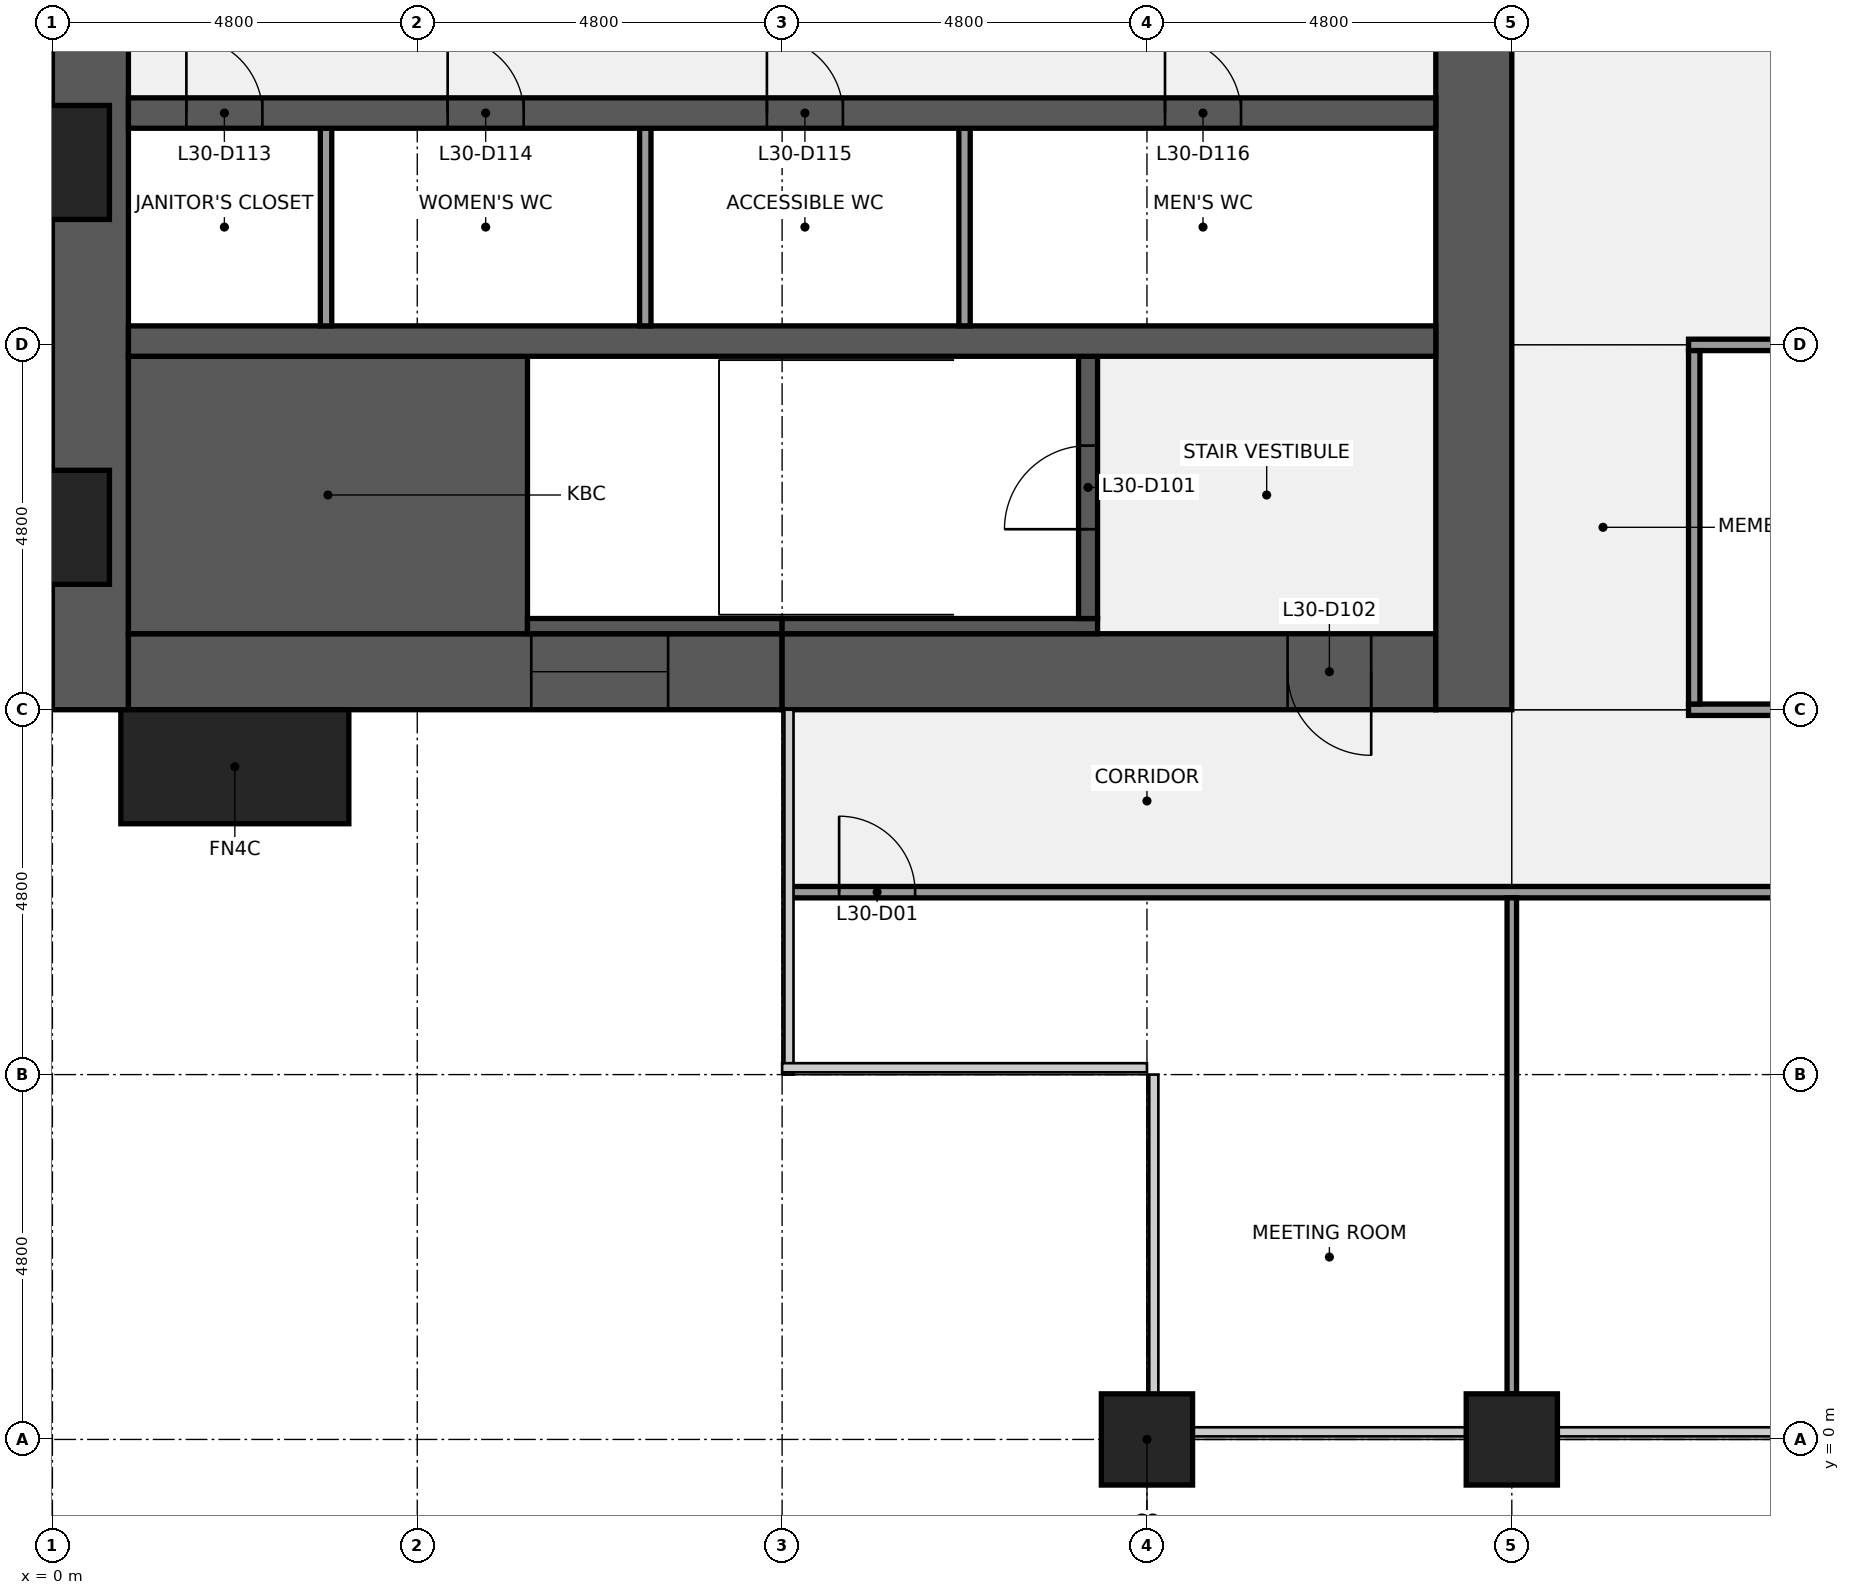
"""IFC4 building model, lengths in metres.
Left out: names, types, materials, properties, quantities, classifications, styles, units other than length and angle.
Written with IfcOpenShell. Run it as: python <this file> out.ifc"""

import sys

from ifc_helpers import new_model, si_unit, direction, frame, frame_2d, origin, origin_2d, place, context, subcontext, project, spatial, rectangle, extrude, element, fill, save


model = new_model("IFC4")
c1 = context("Model", 3, precision=1e-05, world=origin(), true_north=direction((0.0, 1.0)))
c2 = subcontext(c1, "Body", "Model", "MODEL_VIEW")
j1 = project(units=[si_unit("LENGTHUNIT", "METRE"), si_unit("PLANEANGLEUNIT", "RADIAN")], contexts=[c1])
p1 = place(None, origin())
s1 = spatial("IfcSite", under=j1, at=p1, CompositionType="ELEMENT")
p2 = place(p1, origin())
s2 = spatial("IfcBuilding", under=s1, at=p2, CompositionType="ELEMENT")
p3 = place(p2, frame((0.0, 0.0, 140.1)))
s3 = spatial("IfcBuildingStorey", under=s2, at=p3, CompositionType="ELEMENT", Elevation=140.1)
for number, where, z_axis, x_axis in (
    (1, (14.4, 0.0, 0.0), (0.0, 0.0, 1.0), (1.0, 0.0, 0.0)),
    (2, (19.2, 0.0, 0.0), (0.0, 0.0, 1.0), (1.0, 0.0, 0.0)),
):
    element("IfcColumn", number, at=place(p3, frame(where, z_axis=z_axis, x_axis=x_axis)), inside=s3, PredefinedType="COLUMN", context=c2, shape_type="SweptSolid", body=[
        extrude(rectangle(XDim=1.2, YDim=1.2, at=origin_2d()), origin(), (0.0, 0.0, 1.0), 4.0),
    ])
p4 = place(p3, frame((0.5, 9.6, 0.0), z_axis=(0.0, 0.0, 1.0), x_axis=(0.0, 1.0, 0.0)))
e3 = element("IfcWall", 3, at=p4, inside=s3, PredefinedType="SHEAR", context=c2, shape_type="SweptSolid", body=[
    extrude(rectangle(XDim=28.8, YDim=1.0, at=frame_2d((14.4, 0.0))), origin(), (0.0, 0.0, 1.0), 3.84),
])
p5 = place(p4, frame((8.85, 0.0, 0.9)))
e4 = element("IfcOpeningElement", 4, at=p5, cuts=e3, PredefinedType="OPENING", context=c2, shape_type="SweptSolid", body=[
    extrude(rectangle(XDim=1.5, YDim=1.5, at=frame_2d((0.75, 0.75))), frame((0.0, 0.51, 0.0), z_axis=(0.0, -1.0, 0.0), x_axis=(1.0, 0.0, 0.0)), (0.0, 0.0, 1.0), 1.02),
])
p6 = place(p4, frame((18.45, 0.0, 0.9)))
e5 = element("IfcOpeningElement", 5, at=p6, cuts=e3, PredefinedType="OPENING", context=c2, shape_type="SweptSolid", body=[
    extrude(rectangle(XDim=1.5, YDim=1.5, at=frame_2d((0.75, 0.75))), frame((0.0, 0.51, 0.0), z_axis=(0.0, -1.0, 0.0), x_axis=(1.0, 0.0, 0.0)), (0.0, 0.0, 1.0), 1.02),
])
p7 = place(p3, frame((9.6, 10.1, 0.0), z_axis=(0.0, 0.0, 1.0), x_axis=(-1.0, 0.0, 0.0)))
e6 = element("IfcWall", 6, at=p7, inside=s3, PredefinedType="SHEAR", context=c2, shape_type="SweptSolid", body=[
    extrude(rectangle(XDim=8.6, YDim=1.0, at=frame_2d((4.3, 0.0))), origin(), (0.0, 0.0, 1.0), 3.84),
])
p8 = place(p7, frame((1.5, 0.0, 0.9)))
e7 = element("IfcOpeningElement", 7, at=p8, cuts=e6, PredefinedType="OPENING", context=c2, shape_type="SweptSolid", body=[
    extrude(rectangle(XDim=1.8, YDim=1.5, at=frame_2d((0.9, 0.75))), frame((0.0, 0.51, 0.0), z_axis=(0.0, -1.0, 0.0), x_axis=(1.0, 0.0, 0.0)), (0.0, 0.0, 1.0), 1.02),
])
p9 = place(p3, frame((18.2, 10.1, 0.0), z_axis=(0.0, 0.0, 1.0), x_axis=(-1.0, 0.0, 0.0)))
e8 = element("IfcWall", 8, at=p9, inside=s3, PredefinedType="SHEAR", context=c2, shape_type="SweptSolid", body=[
    extrude(rectangle(XDim=8.6, YDim=1.0, at=frame_2d((4.3, 0.0))), origin(), (0.0, 0.0, 1.0), 3.84),
])
p10 = place(p9, frame((0.85, 0.0, 0.0)))
e9 = element("IfcOpeningElement", 9, at=p10, cuts=e8, PredefinedType="OPENING", context=c2, shape_type="SweptSolid", body=[
    extrude(rectangle(XDim=1.1, YDim=2.1, at=frame_2d((0.55, 1.05))), frame((0.0, 0.51, 0.0), z_axis=(0.0, -1.0, 0.0), x_axis=(1.0, 0.0, 0.0)), (0.0, 0.0, 1.0), 1.02),
])
p11 = place(p3, frame((18.7, 38.4, 0.0), z_axis=(0.0, 0.0, 1.0), x_axis=(0.0, -1.0, 0.0)))
e10 = element("IfcWall", 10, at=p11, inside=s3, PredefinedType="SHEAR", context=c2, shape_type="SweptSolid", body=[
    extrude(rectangle(XDim=28.8, YDim=1.0, at=frame_2d((14.4, 0.0))), origin(), (0.0, 0.0, 1.0), 3.84),
])
p12 = place(p11, frame((18.3, 0.0, 0.0)))
e11 = element("IfcOpeningElement", 11, at=p12, cuts=e10, PredefinedType="OPENING", context=c2, shape_type="SweptSolid", body=[
    extrude(rectangle(XDim=1.8, YDim=2.1, at=frame_2d((0.9, 1.05))), frame((0.0, 0.51, 0.0), z_axis=(0.0, -1.0, 0.0), x_axis=(1.0, 0.0, 0.0)), (0.0, 0.0, 1.0), 1.02),
])
p13 = place(p11, frame((8.7, 0.0, 0.0)))
e12 = element("IfcOpeningElement", 12, at=p13, cuts=e10, PredefinedType="OPENING", context=c2, shape_type="SweptSolid", body=[
    extrude(rectangle(XDim=1.8, YDim=2.1, at=frame_2d((0.9, 1.05))), frame((0.0, 0.51, 0.0), z_axis=(0.0, -1.0, 0.0), x_axis=(1.0, 0.0, 0.0)), (0.0, 0.0, 1.0), 1.02),
])
p14 = place(p3, frame((1.0, 12.425, 0.0), z_axis=(0.0, 0.0, 1.0), x_axis=(1.0, 0.0, 0.0)))
e13 = element("IfcWall", 13, at=p14, inside=s3, PredefinedType="SHEAR", context=c2, shape_type="SweptSolid", body=[
    extrude(rectangle(XDim=5.25, YDim=3.65, at=frame_2d((2.625, 0.0))), origin(), (0.0, 0.0, 1.0), 3.84),
])
p15 = place(p3, frame((6.25, 10.7, 0.0), z_axis=(0.0, 0.0, 1.0), x_axis=(1.0, 0.0, 0.0)))
e14 = element("IfcWall", 14, at=p15, inside=s3, PredefinedType="SHEAR", context=c2, shape_type="SweptSolid", body=[
    extrude(rectangle(XDim=3.35, YDim=0.2, at=frame_2d((1.675, 0.0))), origin(), (0.0, 0.0, 1.0), 3.84),
])
p16 = place(p3, frame((9.6, 10.7, 0.0), z_axis=(0.0, 0.0, 1.0), x_axis=(1.0, 0.0, 0.0)))
e15 = element("IfcWall", 15, at=p16, inside=s3, PredefinedType="SHEAR", context=c2, shape_type="SweptSolid", body=[
    extrude(rectangle(XDim=4.15, YDim=0.2, at=frame_2d((2.075, 0.0))), origin(), (0.0, 0.0, 1.0), 3.84),
])
p17 = place(p3, frame((13.625, 10.8, 0.0), z_axis=(0.0, 0.0, 1.0), x_axis=(0.0, 1.0, 0.0)))
e16 = element("IfcWall", 16, at=p17, inside=s3, PredefinedType="SHEAR", context=c2, shape_type="SweptSolid", body=[
    extrude(rectangle(XDim=3.45, YDim=0.25, at=frame_2d((1.725, 0.0))), origin(), (0.0, 0.0, 1.0), 3.84),
])
p18 = place(p17, frame((1.175, 0.0, 0.0)))
e17 = element("IfcOpeningElement", 17, at=p18, cuts=e16, PredefinedType="OPENING", context=c2, shape_type="SweptSolid", body=[
    extrude(rectangle(XDim=1.1, YDim=2.1, at=frame_2d((0.55, 1.05))), frame((0.0, 0.135, 0.0), z_axis=(0.0, -1.0, 0.0), x_axis=(1.0, 0.0, 0.0)), (0.0, 0.0, 1.0), 0.27),
])
p19 = place(p3, frame((1.0, 14.45, 0.0), z_axis=(0.0, 0.0, 1.0), x_axis=(1.0, 0.0, 0.0)))
e18 = element("IfcWall", 18, at=p19, inside=s3, PredefinedType="SHEAR", context=c2, shape_type="SweptSolid", body=[
    extrude(rectangle(XDim=17.2, YDim=0.4, at=frame_2d((8.6, 0.0))), origin(), (0.0, 0.0, 1.0), 3.84),
])
for number, where, z_axis, x_axis in (
    (19, (3.6, 14.65, 0.0), (0.0, 0.0, 1.0), (0.0, 1.0, 0.0)),
    (20, (7.8, 14.65, 0.0), (0.0, 0.0, 1.0), (0.0, 1.0, 0.0)),
    (21, (12.0, 14.65, 0.0), (0.0, 0.0, 1.0), (0.0, 1.0, 0.0)),
):
    element("IfcWall", number, at=place(p3, frame(where, z_axis=z_axis, x_axis=x_axis)), inside=s3, PredefinedType="PARTITIONING", context=c2, shape_type="SweptSolid", body=[
        extrude(rectangle(XDim=2.6, YDim=0.15, at=frame_2d((1.3, 0.0))), origin(), (0.0, 0.0, 1.0), 3.84),
    ])
p20 = place(p3, frame((1.0, 17.45, 0.0), z_axis=(0.0, 0.0, 1.0), x_axis=(1.0, 0.0, 0.0)))
e22 = element("IfcWall", 22, at=p20, inside=s3, PredefinedType="SHEAR", context=c2, shape_type="SweptSolid", body=[
    extrude(rectangle(XDim=17.2, YDim=0.4, at=frame_2d((8.6, 0.0))), origin(), (0.0, 0.0, 1.0), 3.84),
])
p21 = place(p20, frame((0.762, 0.0, 0.0)))
e23 = element("IfcOpeningElement", 23, at=p21, cuts=e22, PredefinedType="OPENING", context=c2, shape_type="SweptSolid", body=[
    extrude(rectangle(XDim=1.0, YDim=2.1, at=frame_2d((0.5, 1.05))), frame((0.0, 0.21, 0.0), z_axis=(0.0, -1.0, 0.0), x_axis=(1.0, 0.0, 0.0)), (0.0, 0.0, 1.0), 0.42),
])
p22 = place(p20, frame((4.2, 0.0, 0.0)))
e24 = element("IfcOpeningElement", 24, at=p22, cuts=e22, PredefinedType="OPENING", context=c2, shape_type="SweptSolid", body=[
    extrude(rectangle(XDim=1.0, YDim=2.1, at=frame_2d((0.5, 1.05))), frame((0.0, 0.21, 0.0), z_axis=(0.0, -1.0, 0.0), x_axis=(1.0, 0.0, 0.0)), (0.0, 0.0, 1.0), 0.42),
])
p23 = place(p20, frame((8.4, 0.0, 0.0)))
e25 = element("IfcOpeningElement", 25, at=p23, cuts=e22, PredefinedType="OPENING", context=c2, shape_type="SweptSolid", body=[
    extrude(rectangle(XDim=1.0, YDim=2.1, at=frame_2d((0.5, 1.05))), frame((0.0, 0.21, 0.0), z_axis=(0.0, -1.0, 0.0), x_axis=(1.0, 0.0, 0.0)), (0.0, 0.0, 1.0), 0.42),
])
p24 = place(p20, frame((13.637, 0.0, 0.0)))
e26 = element("IfcOpeningElement", 26, at=p24, cuts=e22, PredefinedType="OPENING", context=c2, shape_type="SweptSolid", body=[
    extrude(rectangle(XDim=1.0, YDim=2.1, at=frame_2d((0.5, 1.05))), frame((0.0, 0.21, 0.0), z_axis=(0.0, -1.0, 0.0), x_axis=(1.0, 0.0, 0.0)), (0.0, 0.0, 1.0), 0.42),
])
p25 = place(p3, frame((9.7, 7.2, 0.0), z_axis=(0.0, 0.0, 1.0), x_axis=(1.0, 0.0, 0.0)))
e27 = element("IfcWall", 27, at=p25, inside=s3, PredefinedType="PARTITIONING", context=c2, shape_type="SweptSolid", body=[
    extrude(rectangle(XDim=38.2, YDim=0.15, at=frame_2d((19.1, 0.0))), origin(), (0.0, 0.0, 1.0), 2.936),
])
p26 = place(p25, frame((0.65, 0.0, 0.0)))
e28 = element("IfcOpeningElement", 28, at=p26, cuts=e27, PredefinedType="OPENING", context=c2, shape_type="SweptSolid", body=[
    extrude(rectangle(XDim=1.0, YDim=2.1, at=frame_2d((0.5, 1.05))), frame((0.0, 0.085, 0.0), z_axis=(0.0, -1.0, 0.0), x_axis=(1.0, 0.0, 0.0)), (0.0, 0.0, 1.0), 0.17),
])
p27 = place(p25, frame((13.8, 0.0, 0.0)))
e29 = element("IfcOpeningElement", 29, at=p27, cuts=e27, PredefinedType="OPENING", context=c2, shape_type="SweptSolid", body=[
    extrude(rectangle(XDim=1.0, YDim=2.1, at=frame_2d((0.5, 1.05))), frame((0.0, 0.085, 0.0), z_axis=(0.0, -1.0, 0.0), x_axis=(1.0, 0.0, 0.0)), (0.0, 0.0, 1.0), 0.17),
])
p28 = place(p25, frame((19.8, 0.0, 0.0)))
e30 = element("IfcOpeningElement", 30, at=p28, cuts=e27, PredefinedType="OPENING", context=c2, shape_type="SweptSolid", body=[
    extrude(rectangle(XDim=1.0, YDim=2.1, at=frame_2d((0.5, 1.05))), frame((0.0, 0.085, 0.0), z_axis=(0.0, -1.0, 0.0), x_axis=(1.0, 0.0, 0.0)), (0.0, 0.0, 1.0), 0.17),
])
p29 = place(p25, frame((23.4, 0.0, 0.0)))
e31 = element("IfcOpeningElement", 31, at=p29, cuts=e27, PredefinedType="OPENING", context=c2, shape_type="SweptSolid", body=[
    extrude(rectangle(XDim=1.0, YDim=2.1, at=frame_2d((0.5, 1.05))), frame((0.0, 0.085, 0.0), z_axis=(0.0, -1.0, 0.0), x_axis=(1.0, 0.0, 0.0)), (0.0, 0.0, 1.0), 0.17),
])
p30 = place(p25, frame((27.0, 0.0, 0.0)))
e32 = element("IfcOpeningElement", 32, at=p30, cuts=e27, PredefinedType="OPENING", context=c2, shape_type="SweptSolid", body=[
    extrude(rectangle(XDim=1.0, YDim=2.1, at=frame_2d((0.5, 1.05))), frame((0.0, 0.085, 0.0), z_axis=(0.0, -1.0, 0.0), x_axis=(1.0, 0.0, 0.0)), (0.0, 0.0, 1.0), 0.17),
])
p31 = place(p25, frame((32.95, 0.0, 0.0)))
e33 = element("IfcOpeningElement", 33, at=p31, cuts=e27, PredefinedType="OPENING", context=c2, shape_type="SweptSolid", body=[
    extrude(rectangle(XDim=1.0, YDim=2.1, at=frame_2d((0.5, 1.05))), frame((0.0, 0.085, 0.0), z_axis=(0.0, -1.0, 0.0), x_axis=(1.0, 0.0, 0.0)), (0.0, 0.0, 1.0), 0.17),
])
p32 = place(p3, frame((21.525, 9.6, 0.0), z_axis=(0.0, 0.0, 1.0), x_axis=(1.0, 0.0, 0.0)))
e34 = element("IfcWall", 34, at=p32, inside=s3, PredefinedType="PARTITIONING", context=c2, shape_type="SweptSolid", body=[
    extrude(rectangle(XDim=14.55, YDim=0.15, at=frame_2d((7.275, 0.0))), origin(), (0.0, 0.0, 1.0), 2.936),
])
p33 = place(p32, frame((3.175, 0.0, 0.0)))
e35 = element("IfcOpeningElement", 35, at=p33, cuts=e34, PredefinedType="OPENING", context=c2, shape_type="SweptSolid", body=[
    extrude(rectangle(XDim=1.0, YDim=2.1, at=frame_2d((0.5, 1.05))), frame((0.0, 0.085, 0.0), z_axis=(0.0, -1.0, 0.0), x_axis=(1.0, 0.0, 0.0)), (0.0, 0.0, 1.0), 0.17),
])
p34 = place(p32, frame((10.375, 0.0, 0.0)))
e36 = element("IfcOpeningElement", 36, at=p34, cuts=e34, PredefinedType="OPENING", context=c2, shape_type="SweptSolid", body=[
    extrude(rectangle(XDim=1.0, YDim=2.1, at=frame_2d((0.5, 1.05))), frame((0.0, 0.085, 0.0), z_axis=(0.0, -1.0, 0.0), x_axis=(1.0, 0.0, 0.0)), (0.0, 0.0, 1.0), 0.17),
])
p35 = place(p3, frame((21.525, 14.4, 0.0), z_axis=(0.0, 0.0, 1.0), x_axis=(1.0, 0.0, 0.0)))
e37 = element("IfcWall", 37, at=p35, inside=s3, PredefinedType="PARTITIONING", context=c2, shape_type="SweptSolid", body=[
    extrude(rectangle(XDim=2.55, YDim=0.15, at=frame_2d((1.275, 0.0))), origin(), (0.0, 0.0, 1.0), 2.936),
])
p36 = place(p3, frame((19.2, 0.6, 0.0), z_axis=(0.0, 0.0, 1.0), x_axis=(0.0, 1.0, 0.0)))
e38 = element("IfcWall", 38, at=p36, inside=s3, PredefinedType="PARTITIONING", context=c2, shape_type="SweptSolid", body=[
    extrude(rectangle(XDim=6.525, YDim=0.125, at=frame_2d((3.262, 0.0))), origin(), (0.0, 0.0, 1.0), 2.936),
])
p37 = place(p3, frame((21.6, 9.675, 0.0), z_axis=(0.0, 0.0, 1.0), x_axis=(0.0, 1.0, 0.0)))
e39 = element("IfcWall", 39, at=p37, inside=s3, PredefinedType="PARTITIONING", context=c2, shape_type="SweptSolid", body=[
    extrude(rectangle(XDim=4.65, YDim=0.15, at=frame_2d((2.325, 0.0))), origin(), (0.0, 0.0, 1.0), 2.936),
])
p38 = place(p3, frame((2.4, 8.85, 0.0), z_axis=(0.0, 0.0, 1.0), x_axis=(1.0, 0.0, 0.0)))
e40 = element("IfcColumn", 40, at=p38, inside=s3, PredefinedType="PILASTER", context=c2, shape_type="SweptSolid", body=[
    extrude(rectangle(XDim=3.0, YDim=1.5, at=origin_2d()), origin(), (0.0, 0.0, 1.0), 4.0),
])
for number, where, z_axis, x_axis in (
    (41, (14.4, -1.05, 0.0), (0.0, 0.0, 1.0), (1.0, 0.0, 0.0)),
    (42, (19.2, -1.05, 0.0), (0.0, 0.0, 1.0), (1.0, 0.0, 0.0)),
):
    element("IfcColumn", number, at=place(p3, frame(where, z_axis=z_axis, x_axis=x_axis)), inside=s3, PredefinedType="PILASTER", context=c2, shape_type="SweptSolid", body=[
        extrude(rectangle(XDim=3.6, YDim=0.9, at=origin_2d()), origin(), (0.0, 0.0, 1.0), 4.0),
    ])
p39 = place(p18, origin())
e43 = element("IfcDoor", 43, at=p39, inside=s3, OperationType="SINGLE_SWING_LEFT", PredefinedType="DOOR", context=c2, shape_type="SweptSolid", body=[
    extrude(rectangle(XDim=1.1, YDim=2.1, at=frame_2d((0.55, 1.05))), frame((0.0, 0.025, 0.0), z_axis=(0.0, -1.0, 0.0), x_axis=(1.0, 0.0, 0.0)), (0.0, 0.0, 1.0), 0.05),
])
fill(e17, e43)
p40 = place(p10, origin())
e44 = element("IfcDoor", 44, at=p40, inside=s3, OperationType="SINGLE_SWING_LEFT", PredefinedType="DOOR", context=c2, shape_type="SweptSolid", body=[
    extrude(rectangle(XDim=1.1, YDim=2.1, at=frame_2d((0.55, 1.05))), frame((0.0, 0.025, 0.0), z_axis=(0.0, -1.0, 0.0), x_axis=(1.0, 0.0, 0.0)), (0.0, 0.0, 1.0), 0.05),
])
fill(e9, e44)
p41 = place(p21, origin())
e45 = element("IfcDoor", 45, at=p41, inside=s3, OperationType="SINGLE_SWING_LEFT", PredefinedType="DOOR", context=c2, shape_type="SweptSolid", body=[
    extrude(rectangle(XDim=1.0, YDim=2.1, at=frame_2d((0.5, 1.05))), frame((0.0, 0.025, 0.0), z_axis=(0.0, -1.0, 0.0), x_axis=(1.0, 0.0, 0.0)), (0.0, 0.0, 1.0), 0.05),
])
fill(e23, e45)
p42 = place(p22, origin())
e46 = element("IfcDoor", 46, at=p42, inside=s3, OperationType="SINGLE_SWING_LEFT", PredefinedType="DOOR", context=c2, shape_type="SweptSolid", body=[
    extrude(rectangle(XDim=1.0, YDim=2.1, at=frame_2d((0.5, 1.05))), frame((0.0, 0.025, 0.0), z_axis=(0.0, -1.0, 0.0), x_axis=(1.0, 0.0, 0.0)), (0.0, 0.0, 1.0), 0.05),
])
fill(e24, e46)
p43 = place(p23, origin())
e47 = element("IfcDoor", 47, at=p43, inside=s3, OperationType="SINGLE_SWING_LEFT", PredefinedType="DOOR", context=c2, shape_type="SweptSolid", body=[
    extrude(rectangle(XDim=1.0, YDim=2.1, at=frame_2d((0.5, 1.05))), frame((0.0, 0.025, 0.0), z_axis=(0.0, -1.0, 0.0), x_axis=(1.0, 0.0, 0.0)), (0.0, 0.0, 1.0), 0.05),
])
fill(e25, e47)
p44 = place(p24, origin())
e48 = element("IfcDoor", 48, at=p44, inside=s3, OperationType="SINGLE_SWING_LEFT", PredefinedType="DOOR", context=c2, shape_type="SweptSolid", body=[
    extrude(rectangle(XDim=1.0, YDim=2.1, at=frame_2d((0.5, 1.05))), frame((0.0, 0.025, 0.0), z_axis=(0.0, -1.0, 0.0), x_axis=(1.0, 0.0, 0.0)), (0.0, 0.0, 1.0), 0.05),
])
fill(e26, e48)
p45 = place(p8, origin())
e49 = element("IfcWindow", 49, at=p45, inside=s3, PartitioningType="SINGLE_PANEL", PredefinedType="WINDOW", context=c2, shape_type="SweptSolid", body=[
    extrude(rectangle(XDim=1.8, YDim=1.5, at=frame_2d((0.9, 0.75))), frame((0.0, 0.03, 0.0), z_axis=(0.0, -1.0, 0.0), x_axis=(1.0, 0.0, 0.0)), (0.0, 0.0, 1.0), 0.06),
])
fill(e7, e49)
p46 = place(p26, origin())
e50 = element("IfcDoor", 50, at=p46, inside=s3, OperationType="SINGLE_SWING_LEFT", PredefinedType="DOOR", context=c2, shape_type="SweptSolid", body=[
    extrude(rectangle(XDim=1.0, YDim=2.1, at=frame_2d((0.5, 1.05))), frame((0.0, 0.025, 0.0), z_axis=(0.0, -1.0, 0.0), x_axis=(1.0, 0.0, 0.0)), (0.0, 0.0, 1.0), 0.05),
])
fill(e28, e50)
save(model, sys.argv[1])
